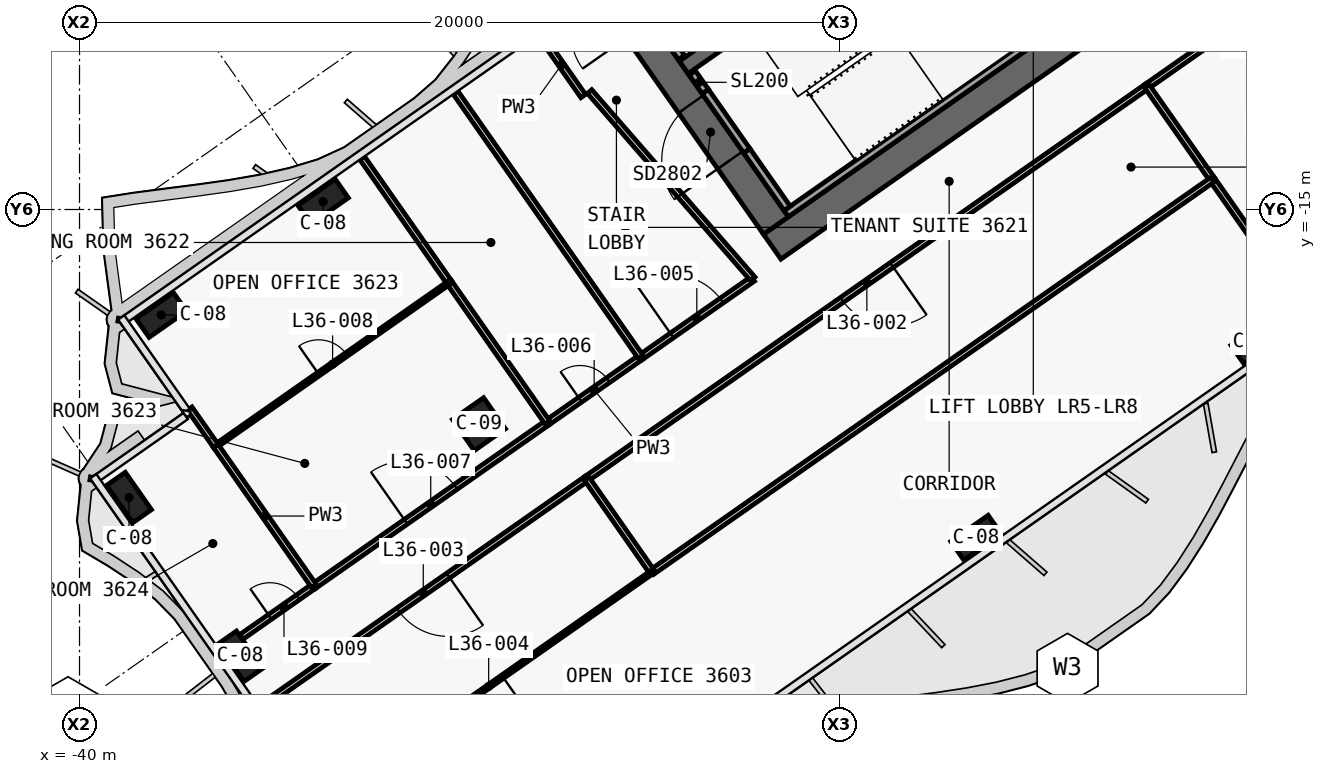
"""IFC4 building model, lengths in metres.
Left out: names, types, materials, properties, quantities, classifications, styles, units other than length and angle.
Written with IfcOpenShell. Run it as: python <this file> out.ifc"""

import sys

from ifc_helpers import new_model, si_unit, direction, frame, frame_2d, origin, origin_2d, place, context, subcontext, project, spatial, polyline, rectangle, outline, extrude, element, fill, save


model = new_model("IFC4")
c1 = context("Model", 3, precision=1e-05, world=origin(), true_north=direction((0.0, 1.0)))
c2 = subcontext(c1, "Body", "Model", "MODEL_VIEW")
j1 = project(units=[si_unit("LENGTHUNIT", "METRE"), si_unit("PLANEANGLEUNIT", "RADIAN")], contexts=[c1])
p1 = place(None, origin())
s1 = spatial("IfcSite", under=j1, at=p1, CompositionType="ELEMENT")
p2 = place(p1, origin())
s2 = spatial("IfcBuilding", under=s1, at=p2, CompositionType="ELEMENT")
p3 = place(p2, frame((0.0, 0.0, 159.3)))
s3 = spatial("IfcBuildingStorey", under=s2, at=p3, CompositionType="ELEMENT", Elevation=159.3)
p4 = place(p3, frame((0.029, -0.712, 0.0), z_axis=(0.0, 0.0, 1.0), x_axis=(-0.819151758019, -0.573576845187, 0.0)))
e1 = element("IfcWall", 1, at=p4, inside=s3, PredefinedType="SHEAR", context=c2, shape_type="SweptSolid", body=[
    extrude(outline(polyline([(26.616, 0.4), (0.56, 0.4), (-0.0, -0.4), (26.616, -0.4), (26.616, 0.4)])), origin(), (0.0, 0.0, 1.0), 3.9),
])
p5 = place(p4, frame((2.966, 0.0, 0.0)))
e2 = element("IfcOpeningElement", 2, at=p5, cuts=e1, PredefinedType="OPENING", context=c2, shape_type="SweptSolid", body=[
    extrude(rectangle(XDim=2.4, YDim=2.1, at=frame_2d((1.2, 1.05))), frame((0.0, 0.41, 0.0), z_axis=(0.0, -1.0, 0.0), x_axis=(1.0, 0.0, 0.0)), (0.0, 0.0, 1.0), 0.82),
])
p6 = place(p4, frame((11.916, 0.0, 0.0)))
e3 = element("IfcOpeningElement", 3, at=p6, cuts=e1, PredefinedType="OPENING", context=c2, shape_type="SweptSolid", body=[
    extrude(rectangle(XDim=2.4, YDim=2.1, at=frame_2d((1.2, 1.05))), frame((0.0, 0.41, 0.0), z_axis=(0.0, -1.0, 0.0), x_axis=(1.0, 0.0, 0.0)), (0.0, 0.0, 1.0), 0.82),
])
p7 = place(p3, frame((-21.675, -15.421, 0.0), z_axis=(0.0, 0.0, 1.0), x_axis=(-0.573581815061, 0.819148278049, 0.0)))
e4 = element("IfcWall", 4, at=p7, inside=s3, PredefinedType="SHEAR", context=c2, shape_type="SweptSolid", body=[
    extrude(outline(polyline([(0.0, 0.4), (0.0, -0.4), (9.6, -0.4), (9.6, 0.4), (0.0, 0.4)])), origin(), (0.0, 0.0, 1.0), 3.9),
])
p8 = place(p7, frame((6.3, 0.0, 0.0)))
e5 = element("IfcOpeningElement", 5, at=p8, cuts=e4, PredefinedType="OPENING", context=c2, shape_type="SweptSolid", body=[
    extrude(rectangle(XDim=1.8, YDim=2.1, at=frame_2d((0.9, 1.05))), frame((0.0, 0.41, 0.0), z_axis=(0.0, -1.0, 0.0), x_axis=(1.0, 0.0, 0.0)), (0.0, 0.0, 1.0), 0.82),
])
p9 = place(p7, frame((2.1, 0.0, 0.0)))
e6 = element("IfcOpeningElement", 6, at=p9, cuts=e4, PredefinedType="OPENING", context=c2, shape_type="SweptSolid", body=[
    extrude(rectangle(XDim=1.8, YDim=2.1, at=frame_2d((0.9, 1.05))), frame((0.0, 0.41, 0.0), z_axis=(0.0, -1.0, 0.0), x_axis=(1.0, 0.0, 0.0)), (0.0, 0.0, 1.0), 0.82),
])
p10 = place(p3, frame((-2.638, 3.768, 0.0), z_axis=(0.0, 0.0, 1.0), x_axis=(-0.81915267502, -0.573575535572, 0.0)))
e7 = element("IfcWall", 7, at=p10, inside=s3, PredefinedType="SHEAR", context=c2, shape_type="SweptSolid", body=[
    extrude(outline(polyline([(26.2, 0.2), (0.0, 0.2), (0.0, -0.2), (26.2, -0.2), (26.2, 0.2)])), origin(), (0.0, 0.0, 1.0), 3.9),
])
p11 = place(p10, frame((1.169, 0.0, 0.0)))
e8 = element("IfcOpeningElement", 8, at=p11, cuts=e7, PredefinedType="OPENING", context=c2, shape_type="SweptSolid", body=[
    extrude(rectangle(XDim=1.1, YDim=2.1, at=frame_2d((0.55, 1.05))), frame((0.0, 0.21, 0.0), z_axis=(0.0, -1.0, 0.0), x_axis=(1.0, 0.0, 0.0)), (0.0, 0.0, 1.0), 0.42),
])
p12 = place(p10, frame((3.206, 0.0, 0.0)))
e9 = element("IfcOpeningElement", 9, at=p12, cuts=e7, PredefinedType="OPENING", context=c2, shape_type="SweptSolid", body=[
    extrude(rectangle(XDim=1.1, YDim=2.1, at=frame_2d((0.55, 1.05))), frame((0.0, 0.21, 0.0), z_axis=(0.0, -1.0, 0.0), x_axis=(1.0, 0.0, 0.0)), (0.0, 0.0, 1.0), 0.42),
])
p13 = place(p10, frame((5.244, 0.0, 0.0)))
e10 = element("IfcOpeningElement", 10, at=p13, cuts=e7, PredefinedType="OPENING", context=c2, shape_type="SweptSolid", body=[
    extrude(rectangle(XDim=1.1, YDim=2.1, at=frame_2d((0.55, 1.05))), frame((0.0, 0.21, 0.0), z_axis=(0.0, -1.0, 0.0), x_axis=(1.0, 0.0, 0.0)), (0.0, 0.0, 1.0), 0.42),
])
p14 = place(p10, frame((7.281, 0.0, 0.0)))
e11 = element("IfcOpeningElement", 11, at=p14, cuts=e7, PredefinedType="OPENING", context=c2, shape_type="SweptSolid", body=[
    extrude(rectangle(XDim=1.1, YDim=2.1, at=frame_2d((0.55, 1.05))), frame((0.0, 0.21, 0.0), z_axis=(0.0, -1.0, 0.0), x_axis=(1.0, 0.0, 0.0)), (0.0, 0.0, 1.0), 0.42),
])
p15 = place(p10, frame((9.688, 0.0, 0.0)))
e12 = element("IfcOpeningElement", 12, at=p15, cuts=e7, PredefinedType="OPENING", context=c2, shape_type="SweptSolid", body=[
    extrude(rectangle(XDim=1.1, YDim=2.1, at=frame_2d((0.55, 1.05))), frame((0.0, 0.21, 0.0), z_axis=(0.0, -1.0, 0.0), x_axis=(1.0, 0.0, 0.0)), (0.0, 0.0, 1.0), 0.42),
])
p16 = place(p10, frame((11.863, 0.0, 0.0)))
e13 = element("IfcOpeningElement", 13, at=p16, cuts=e7, PredefinedType="OPENING", context=c2, shape_type="SweptSolid", body=[
    extrude(rectangle(XDim=1.1, YDim=2.1, at=frame_2d((0.55, 1.05))), frame((0.0, 0.21, 0.0), z_axis=(0.0, -1.0, 0.0), x_axis=(1.0, 0.0, 0.0)), (0.0, 0.0, 1.0), 0.42),
])
p17 = place(p10, frame((14.038, 0.0, 0.0)))
e14 = element("IfcOpeningElement", 14, at=p17, cuts=e7, PredefinedType="OPENING", context=c2, shape_type="SweptSolid", body=[
    extrude(rectangle(XDim=1.1, YDim=2.1, at=frame_2d((0.55, 1.05))), frame((0.0, 0.21, 0.0), z_axis=(0.0, -1.0, 0.0), x_axis=(1.0, 0.0, 0.0)), (0.0, 0.0, 1.0), 0.42),
])
p18 = place(p10, frame((16.212, 0.0, 0.0)))
e15 = element("IfcOpeningElement", 15, at=p18, cuts=e7, PredefinedType="OPENING", context=c2, shape_type="SweptSolid", body=[
    extrude(rectangle(XDim=1.1, YDim=2.1, at=frame_2d((0.55, 1.05))), frame((0.0, 0.21, 0.0), z_axis=(0.0, -1.0, 0.0), x_axis=(1.0, 0.0, 0.0)), (0.0, 0.0, 1.0), 0.42),
])
for number, where, z_axis, x_axis in (
    (16, (-9.038, -18.475, 0.0), (0.0, 0.0, 1.0), (-0.819, -0.574, 0.0)),
    (17, (-16.41, -23.637, 0.0), (0.0, 0.0, 1.0), (-0.819, -0.574, 0.0)),
    (18, (-33.591, -14.792, 0.0), (0.0, 0.0, 1.0), (-0.819, -0.574, 0.0)),
    (19, (-37.85, -17.774, 0.0), (0.0, 0.0, 1.0), (-0.819, -0.574, 0.0)),
    (20, (-35.772, -26.757, 0.0), (0.0, 0.0, 1.0), (-0.574, 0.819, 0.0)),
    (21, (-38.698, -22.579, 0.0), (0.0, 0.0, 1.0), (-0.574, 0.819, 0.0)),
):
    element("IfcColumn", number, at=place(p3, frame(where, z_axis=z_axis, x_axis=x_axis)), inside=s3, PredefinedType="COLUMN", context=c2, shape_type="SweptSolid", body=[
        extrude(rectangle(XDim=1.2, YDim=0.6, at=origin_2d()), origin(), (0.0, 0.0, 1.0), 3.9),
    ])
p19 = place(p3, frame((-29.49, -20.649, 0.0), z_axis=(0.0, 0.0, 1.0), x_axis=(-0.819152044289, -0.573576436351, 0.0)))
e22 = element("IfcColumn", 22, at=p19, inside=s3, PredefinedType="COLUMN", context=c2, shape_type="SweptSolid", body=[
    extrude(rectangle(XDim=1.0, YDim=1.0, at=origin_2d()), origin(), (0.0, 0.0, 1.0), 3.9),
])
p20 = place(p3, frame((-24.162, -10.998, 0.0), z_axis=(0.0, 0.0, 1.0), x_axis=(-0.573612502218, 0.819126789514, 0.0)))
e23 = element("IfcWall", 23, at=p20, inside=s3, PredefinedType="SOLIDWALL", context=c2, shape_type="SweptSolid", body=[
    extrude(rectangle(XDim=1.2, YDim=0.2, at=frame_2d((0.6, 0.0))), origin(), (0.0, 0.0, 1.0), 3.62),
])
p21 = place(p3, frame((-14.851, -10.521, 0.0), z_axis=(0.0, 0.0, 1.0), x_axis=(-0.819141584393, -0.57359137434, 0.0)))
e24 = element("IfcWall", 24, at=p21, inside=s3, PredefinedType="SOLIDWALL", context=c2, shape_type="SweptSolid", body=[
    extrude(rectangle(XDim=8.0, YDim=0.2, at=frame_2d((4.0, 0.0))), origin(), (0.0, 0.0, 1.0), 3.62),
])
p22 = place(p3, frame((-21.38, -14.97, 0.0), z_axis=(0.0, 0.0, 1.0), x_axis=(-0.573559770908, 0.819163713305, 0.0)))
e25 = element("IfcWall", 25, at=p22, inside=s3, PredefinedType="SOLIDWALL", context=c2, shape_type="SweptSolid", body=[
    extrude(rectangle(XDim=1.85, YDim=0.2, at=frame_2d((0.925, 0.0))), origin(), (0.0, 0.0, 1.0), 3.62),
])
p23 = place(p3, frame((-23.531, -11.898, 0.0), z_axis=(0.0, 0.0, 1.0), x_axis=(-0.573708088123, 0.819059844958, 0.0)))
e26 = element("IfcWall", 26, at=p23, inside=s3, PredefinedType="SOLIDWALL", context=c2, shape_type="SweptSolid", body=[
    extrude(rectangle(XDim=0.6, YDim=0.2, at=frame_2d((0.3, 0.0))), origin(), (0.0, 0.0, 1.0), 3.62),
])
p24 = place(p3, frame((-22.441, -13.455, 2.15), z_axis=(0.0, 0.0, 1.0), x_axis=(-0.573591692345, 0.819141361715, 0.0)))
e27 = element("IfcWall", 27, at=p24, inside=s3, PredefinedType="SOLIDWALL", context=c2, shape_type="SweptSolid", body=[
    extrude(rectangle(XDim=1.9, YDim=0.2, at=frame_2d((0.95, 0.0))), origin(), (0.0, 0.0, 1.0), 1.47),
])
p25 = place(p3, frame((-25.231, -18.888, 0.0), z_axis=(0.0, 0.0, 1.0), x_axis=(0.819152236293, 0.573576162141, 0.0)))
e28 = element("IfcWall", 28, at=p25, inside=s3, PredefinedType="PARTITIONING", context=c2, shape_type="SweptSolid", body=[
    extrude(rectangle(XDim=3.599, YDim=0.15, at=frame_2d((1.799, 0.0))), origin(), (0.0, 0.0, 1.0), 3.0),
])
p26 = place(p25, frame((1.0, 0.0, 0.0)))
e29 = element("IfcOpeningElement", 29, at=p26, cuts=e28, PredefinedType="OPENING", context=c2, shape_type="SweptSolid", body=[
    extrude(rectangle(XDim=1.6, YDim=2.1, at=frame_2d((0.8, 1.05))), frame((0.0, 0.085, 0.0), z_axis=(0.0, -1.0, 0.0), x_axis=(1.0, 0.0, 0.0)), (0.0, 0.0, 1.0), 0.17),
])
p27 = place(p3, frame((-27.688, -20.609, 0.0), z_axis=(0.0, 0.0, 1.0), x_axis=(0.81916700466, 0.573555070134, 0.0)))
e30 = element("IfcWall", 30, at=p27, inside=s3, PredefinedType="PARTITIONING", context=c2, shape_type="SweptSolid", body=[
    extrude(rectangle(XDim=3.004, YDim=0.15, at=frame_2d((1.502, 0.0))), origin(), (0.0, 0.0, 1.0), 3.62),
])
p28 = place(p27, frame((1.052, 0.0, 0.0)))
e31 = element("IfcOpeningElement", 31, at=p28, cuts=e30, PredefinedType="OPENING", context=c2, shape_type="SweptSolid", body=[
    extrude(rectangle(XDim=0.9, YDim=2.1, at=frame_2d((0.45, 1.05))), frame((0.0, 0.085, 0.0), z_axis=(0.0, -1.0, 0.0), x_axis=(1.0, 0.0, 0.0)), (0.0, 0.0, 1.0), 0.17),
])
p29 = place(p3, frame((-33.832, -24.911, 0.0), z_axis=(0.0, 0.0, 1.0), x_axis=(0.819127966345, 0.573610821682, 0.0)))
e32 = element("IfcWall", 32, at=p29, inside=s3, PredefinedType="PARTITIONING", context=c2, shape_type="SweptSolid", body=[
    extrude(rectangle(XDim=7.504, YDim=0.15, at=frame_2d((3.752, 0.0))), origin(), (0.0, 0.0, 1.0), 3.0),
])
p30 = place(p29, frame((2.952, 0.0, 0.0)))
e33 = element("IfcOpeningElement", 33, at=p30, cuts=e32, PredefinedType="OPENING", context=c2, shape_type="SweptSolid", body=[
    extrude(rectangle(XDim=1.6, YDim=2.1, at=frame_2d((0.8, 1.05))), frame((0.0, 0.085, 0.0), z_axis=(0.0, -1.0, 0.0), x_axis=(1.0, 0.0, 0.0)), (0.0, 0.0, 1.0), 0.17),
])
p31 = place(p3, frame((-35.739, -26.247, 0.0), z_axis=(0.0, 0.0, 1.0), x_axis=(0.819123698998, 0.573616915492, 0.0)))
e34 = element("IfcWall", 34, at=p31, inside=s3, PredefinedType="PARTITIONING", context=c2, shape_type="SweptSolid", body=[
    extrude(rectangle(XDim=2.332, YDim=0.15, at=frame_2d((1.166, 0.0))), origin(), (0.0, 0.0, 1.0), 3.0),
])
p32 = place(p31, frame((0.916, 0.0, 0.0)))
e35 = element("IfcOpeningElement", 35, at=p32, cuts=e34, PredefinedType="OPENING", context=c2, shape_type="SweptSolid", body=[
    extrude(rectangle(XDim=0.9, YDim=2.1, at=frame_2d((0.45, 1.05))), frame((0.0, 0.085, 0.0), z_axis=(0.0, -1.0, 0.0), x_axis=(1.0, 0.0, 0.0)), (0.0, 0.0, 1.0), 0.17),
])
p33 = place(p3, frame((-5.766, -7.456, 0.0), z_axis=(0.0, 0.0, 1.0), x_axis=(-0.819150881364, -0.573578097177, 0.0)))
e36 = element("IfcWall", 36, at=p33, inside=s3, PredefinedType="PARTITIONING", context=c2, shape_type="SweptSolid", body=[
    extrude(rectangle(XDim=7.502, YDim=0.15, at=frame_2d((3.751, 0.0))), origin(), (0.0, 0.0, 1.0), 3.0),
])
p34 = place(p33, frame((2.951, 0.0, 0.0)))
e37 = element("IfcOpeningElement", 37, at=p34, cuts=e36, PredefinedType="OPENING", context=c2, shape_type="SweptSolid", body=[
    extrude(rectangle(XDim=1.6, YDim=2.1, at=frame_2d((0.8, 1.05))), frame((0.0, 0.085, 0.0), z_axis=(0.0, -1.0, 0.0), x_axis=(1.0, 0.0, 0.0)), (0.0, 0.0, 1.0), 0.17),
])
p35 = place(p3, frame((-11.908, -11.757, 0.0), z_axis=(0.0, 0.0, 1.0), x_axis=(-0.81915291695, -0.57357519006, 0.0)))
e38 = element("IfcWall", 38, at=p35, inside=s3, PredefinedType="PARTITIONING", context=c2, shape_type="SweptSolid", body=[
    extrude(rectangle(XDim=18.004, YDim=0.15, at=frame_2d((9.002, 0.0))), origin(), (0.0, 0.0, 1.0), 3.0),
])
p36 = place(p35, frame((8.202, 0.0, 0.0)))
e39 = element("IfcOpeningElement", 39, at=p36, cuts=e38, PredefinedType="OPENING", context=c2, shape_type="SweptSolid", body=[
    extrude(rectangle(XDim=1.6, YDim=2.1, at=frame_2d((0.8, 1.05))), frame((0.0, 0.085, 0.0), z_axis=(0.0, -1.0, 0.0), x_axis=(1.0, 0.0, 0.0)), (0.0, 0.0, 1.0), 0.17),
])
p37 = place(p3, frame((-26.653, -22.081, 0.0), z_axis=(0.0, 0.0, 1.0), x_axis=(-0.819154371039, -0.573573113393, 0.0)))
e40 = element("IfcWall", 40, at=p37, inside=s3, PredefinedType="PARTITIONING", context=c2, shape_type="SweptSolid", body=[
    extrude(rectangle(XDim=10.502, YDim=0.15, at=frame_2d((5.251, 0.0))), origin(), (0.0, 0.0, 1.0), 2.9),
])
p38 = place(p37, frame((4.451, 0.0, 0.0)))
e41 = element("IfcOpeningElement", 41, at=p38, cuts=e40, PredefinedType="OPENING", context=c2, shape_type="SweptSolid", body=[
    extrude(rectangle(XDim=1.6, YDim=2.1, at=frame_2d((0.8, 1.05))), frame((0.0, 0.085, 0.0), z_axis=(0.0, -1.0, 0.0), x_axis=(1.0, 0.0, 0.0)), (0.0, 0.0, 1.0), 0.17),
])
p39 = place(p3, frame((-26.746, -12.014, 0.0), z_axis=(0.0, 0.0, 1.0), x_axis=(-0.573568836472, 0.819157365729, 0.0)))
e42 = element("IfcWall", 42, at=p39, inside=s3, PredefinedType="PARTITIONING", context=c2, shape_type="SweptSolid", body=[
    extrude(rectangle(XDim=2.0, YDim=0.15, at=frame_2d((1.0, 0.0))), origin(), (0.0, 0.0, 1.0), 3.0),
])
p40 = place(p3, frame((-22.284, -16.826, 0.0), z_axis=(0.0, 0.0, 1.0), x_axis=(-0.656758142177, 0.754101281449, 0.0)))
e43 = element("IfcWall", 43, at=p40, inside=s3, PredefinedType="PARTITIONING", context=c2, shape_type="SweptSolid", body=[
    extrude(rectangle(XDim=6.539, YDim=0.15, at=frame_2d((3.269, 0.0))), origin(), (0.0, 0.0, 1.0), 3.0),
])
p41 = place(p3, frame((-25.23, -18.887, 0.0), z_axis=(0.0, 0.0, 1.0), x_axis=(-0.573572219642, 0.819154996844, 0.0)))
e44 = element("IfcWall", 44, at=p41, inside=s3, PredefinedType="PARTITIONING", context=c2, shape_type="SweptSolid", body=[
    extrude(rectangle(XDim=8.5, YDim=0.15, at=frame_2d((4.25, 0.0))), origin(), (0.0, 0.0, 1.0), 3.0),
])
p42 = place(p3, frame((-30.268, -16.922, 0.0), z_axis=(0.0, 0.0, 1.0), x_axis=(-0.573593387921, 0.81914017441, 0.0)))
e45 = element("IfcWall", 45, at=p42, inside=s3, PredefinedType="PARTITIONING", context=c2, shape_type="SweptSolid", body=[
    extrude(rectangle(XDim=4.001, YDim=0.15, at=frame_2d((2.0, 0.0))), origin(), (0.0, 0.0, 1.0), 3.0),
])
p43 = place(p3, frame((-27.687, -20.607, 0.0), z_axis=(0.0, 0.0, 1.0), x_axis=(-0.573553333433, 0.819168220641, 0.0)))
e46 = element("IfcWall", 46, at=p43, inside=s3, PredefinedType="PARTITIONING", context=c2, shape_type="SweptSolid", body=[
    extrude(rectangle(XDim=4.502, YDim=0.15, at=frame_2d((2.251, 0.0))), origin(), (0.0, 0.0, 1.0), 3.0),
])
p44 = place(p3, frame((-36.413, -21.222, 0.0), z_axis=(0.0, 0.0, 1.0), x_axis=(0.819147803225, 0.57358249317, 0.0)))
e47 = element("IfcWall", 47, at=p44, inside=s3, PredefinedType="PARTITIONING", context=c2, shape_type="SweptSolid", body=[
    extrude(rectangle(XDim=7.5, YDim=0.1, at=frame_2d((3.75, 0.0))), origin(), (0.0, 0.0, 1.0), 3.0),
])
p45 = place(p44, frame((3.3, 0.0, 0.0)))
e48 = element("IfcOpeningElement", 48, at=p45, cuts=e47, PredefinedType="OPENING", context=c2, shape_type="SweptSolid", body=[
    extrude(rectangle(XDim=0.9, YDim=2.1, at=frame_2d((0.45, 1.05))), frame((0.0, 0.06, 0.0), z_axis=(0.0, -1.0, 0.0), x_axis=(1.0, 0.0, 0.0)), (0.0, 0.0, 1.0), 0.12),
])
p46 = place(p3, frame((-36.413, -21.222, 0.0), z_axis=(0.0, 0.0, 1.0), x_axis=(-0.573462344363, 0.819231920519, 0.0)))
e49 = element("IfcWall", 49, at=p46, inside=s3, PredefinedType="PARTITIONING", context=c2, shape_type="SweptSolid", body=[
    extrude(rectangle(XDim=1.201, YDim=0.15, at=frame_2d((0.601, 0.0))), origin(), (0.0, 0.0, 1.0), 3.62),
])
p47 = place(p3, frame((-33.831, -24.909, 0.0), z_axis=(0.0, 0.0, 1.0), x_axis=(-0.573560650686, 0.819163097304, 0.0)))
e50 = element("IfcWall", 50, at=p47, inside=s3, PredefinedType="PARTITIONING", context=c2, shape_type="SweptSolid", body=[
    extrude(rectangle(XDim=4.5, YDim=0.15, at=frame_2d((2.25, 0.0))), origin(), (0.0, 0.0, 1.0), 3.0),
])
p48 = place(p3, frame((-10.188, -14.217, 0.0), z_axis=(0.0, 0.0, 1.0), x_axis=(-0.57356603932, 0.81915932427, 0.0)))
e51 = element("IfcWall", 51, at=p48, inside=s3, PredefinedType="PARTITIONING", context=c2, shape_type="SweptSolid", body=[
    extrude(rectangle(XDim=3.002, YDim=0.15, at=frame_2d((1.501, 0.0))), origin(), (0.0, 0.0, 1.0), 3.62),
])
p49 = place(p3, frame((-7.608, -17.901, 0.0), z_axis=(0.0, 0.0, 1.0), x_axis=(-0.573556991349, 0.819165659482, 0.0)))
e52 = element("IfcWall", 52, at=p49, inside=s3, PredefinedType="PARTITIONING", context=c2, shape_type="SweptSolid", body=[
    extrude(rectangle(XDim=4.501, YDim=0.15, at=frame_2d((2.25, 0.0))), origin(), (0.0, 0.0, 1.0), 2.9),
])
p50 = place(p3, frame((-10.189, -14.215, 0.0), z_axis=(0.0, 0.0, 1.0), x_axis=(-0.81915226268, -0.573576124456, 0.0)))
e53 = element("IfcWall", 53, at=p50, inside=s3, PredefinedType="PARTITIONING", context=c2, shape_type="SweptSolid", body=[
    extrude(rectangle(XDim=18.0, YDim=0.15, at=frame_2d((9.0, 0.0))), origin(), (0.0, 0.0, 1.0), 3.0),
])
p51 = place(p3, frame((-24.934, -24.54, 0.0), z_axis=(0.0, 0.0, 1.0), x_axis=(-0.573560650686, 0.819163097304, 0.0)))
e54 = element("IfcWall", 54, at=p51, inside=s3, PredefinedType="PARTITIONING", context=c2, shape_type="SweptSolid", body=[
    extrude(rectangle(XDim=3.0, YDim=0.15, at=frame_2d((1.5, 0.0))), origin(), (0.0, 0.0, 1.0), 3.62),
])
p52 = place(p3, frame((-24.933, -24.54, 0.0), z_axis=(0.0, 0.0, 1.0), x_axis=(-0.819155448096, -0.573571575181, 0.0)))
e55 = element("IfcWall", 55, at=p52, inside=s3, PredefinedType="PARTITIONING", context=c2, shape_type="SweptSolid", body=[
    extrude(rectangle(XDim=10.5, YDim=0.1, at=frame_2d((5.25, 0.0))), origin(), (0.0, 0.0, 1.0), 2.9),
])
p53 = place(p52, frame((4.8, 0.0, 0.0)))
e56 = element("IfcOpeningElement", 56, at=p53, cuts=e55, PredefinedType="OPENING", context=c2, shape_type="SweptSolid", body=[
    extrude(rectangle(XDim=0.9, YDim=2.1, at=frame_2d((0.45, 1.05))), frame((0.0, 0.06, 0.0), z_axis=(0.0, -1.0, 0.0), x_axis=(1.0, 0.0, 0.0)), (0.0, 0.0, 1.0), 0.12),
])
p54 = place(p9, origin())
e57 = element("IfcDoor", 57, at=p54, inside=s3, OperationType="DOUBLE_DOOR_SINGLE_SWING", PredefinedType="DOOR", context=c2, shape_type="SweptSolid", body=[
    extrude(rectangle(XDim=1.8, YDim=2.1, at=frame_2d((0.9, 1.05))), frame((0.0, 0.025, 0.0), z_axis=(0.0, -1.0, 0.0), x_axis=(1.0, 0.0, 0.0)), (0.0, 0.0, 1.0), 0.05),
])
fill(e6, e57)
p55 = place(p36, origin())
e58 = element("IfcDoor", 58, at=p55, inside=s3, OperationType="DOUBLE_DOOR_SINGLE_SWING", PredefinedType="DOOR", context=c2, shape_type="SweptSolid", body=[
    extrude(rectangle(XDim=1.6, YDim=2.1, at=frame_2d((0.8, 1.05))), frame((0.0, 0.025, 0.0), z_axis=(0.0, -1.0, 0.0), x_axis=(1.0, 0.0, 0.0)), (0.0, 0.0, 1.0), 0.05),
])
fill(e39, e58)
p56 = place(p38, origin())
e59 = element("IfcDoor", 59, at=p56, inside=s3, OperationType="DOUBLE_DOOR_SINGLE_SWING", PredefinedType="DOOR", context=c2, shape_type="SweptSolid", body=[
    extrude(rectangle(XDim=1.6, YDim=2.1, at=frame_2d((0.8, 1.05))), frame((0.0, 0.025, 0.0), z_axis=(0.0, -1.0, 0.0), x_axis=(1.0, 0.0, 0.0)), (0.0, 0.0, 1.0), 0.05),
])
fill(e41, e59)
p57 = place(p53, origin())
e60 = element("IfcDoor", 60, at=p57, inside=s3, OperationType="SINGLE_SWING_LEFT", PredefinedType="DOOR", context=c2, shape_type="SweptSolid", body=[
    extrude(rectangle(XDim=0.9, YDim=2.1, at=frame_2d((0.45, 1.05))), frame((0.0, 0.025, 0.0), z_axis=(0.0, -1.0, 0.0), x_axis=(1.0, 0.0, 0.0)), (0.0, 0.0, 1.0), 0.05),
])
fill(e56, e60)
p58 = place(p26, origin())
e61 = element("IfcDoor", 61, at=p58, inside=s3, OperationType="DOUBLE_DOOR_SINGLE_SWING", PredefinedType="DOOR", context=c2, shape_type="SweptSolid", body=[
    extrude(rectangle(XDim=1.6, YDim=2.1, at=frame_2d((0.8, 1.05))), frame((0.0, 0.025, 0.0), z_axis=(0.0, -1.0, 0.0), x_axis=(1.0, 0.0, 0.0)), (0.0, 0.0, 1.0), 0.05),
])
fill(e29, e61)
p59 = place(p28, origin())
e62 = element("IfcDoor", 62, at=p59, inside=s3, OperationType="SINGLE_SWING_LEFT", PredefinedType="DOOR", context=c2, shape_type="SweptSolid", body=[
    extrude(rectangle(XDim=0.9, YDim=2.1, at=frame_2d((0.45, 1.05))), frame((0.0, 0.025, 0.0), z_axis=(0.0, -1.0, 0.0), x_axis=(1.0, 0.0, 0.0)), (0.0, 0.0, 1.0), 0.05),
])
fill(e31, e62)
p60 = place(p30, origin())
e63 = element("IfcDoor", 63, at=p60, inside=s3, OperationType="DOUBLE_DOOR_SINGLE_SWING", PredefinedType="DOOR", context=c2, shape_type="SweptSolid", body=[
    extrude(rectangle(XDim=1.6, YDim=2.1, at=frame_2d((0.8, 1.05))), frame((0.0, 0.025, 0.0), z_axis=(0.0, -1.0, 0.0), x_axis=(1.0, 0.0, 0.0)), (0.0, 0.0, 1.0), 0.05),
])
fill(e33, e63)
p61 = place(p45, origin())
e64 = element("IfcDoor", 64, at=p61, inside=s3, OperationType="SINGLE_SWING_RIGHT", PredefinedType="DOOR", context=c2, shape_type="SweptSolid", body=[
    extrude(rectangle(XDim=0.9, YDim=2.1, at=frame_2d((0.45, 1.05))), frame((0.0, 0.025, 0.0), z_axis=(0.0, -1.0, 0.0), x_axis=(1.0, 0.0, 0.0)), (0.0, 0.0, 1.0), 0.05),
])
fill(e48, e64)
p62 = place(p32, origin())
e65 = element("IfcDoor", 65, at=p62, inside=s3, OperationType="SINGLE_SWING_LEFT", PredefinedType="DOOR", context=c2, shape_type="SweptSolid", body=[
    extrude(rectangle(XDim=0.9, YDim=2.1, at=frame_2d((0.45, 1.05))), frame((0.0, 0.025, 0.0), z_axis=(0.0, -1.0, 0.0), x_axis=(1.0, 0.0, 0.0)), (0.0, 0.0, 1.0), 0.05),
])
fill(e35, e65)
save(model, sys.argv[1])
